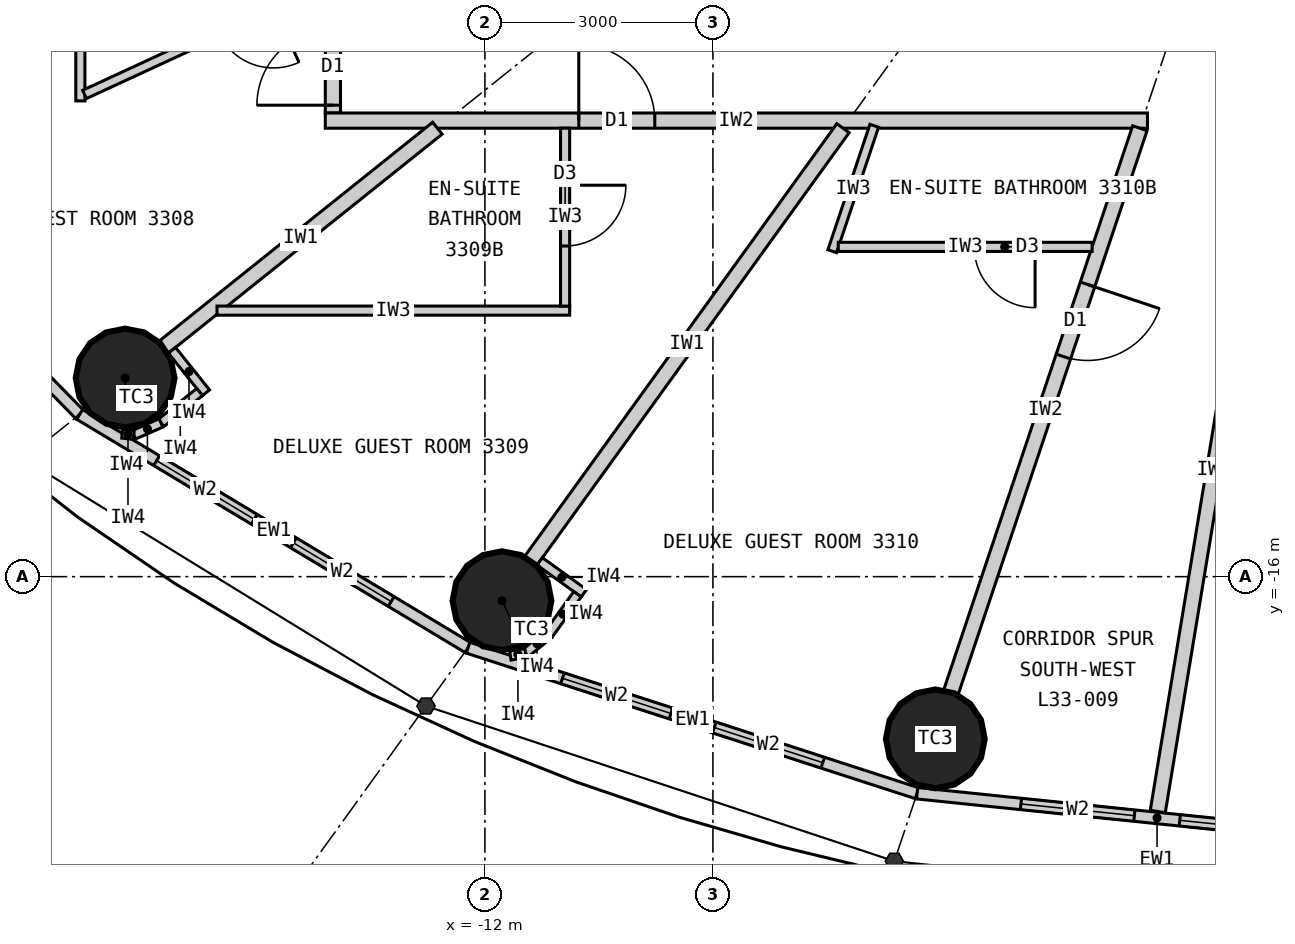
"""IFC4 building model, lengths in metres.
Left out: names, types, materials, properties, quantities, classifications, styles, units other than length and angle.
Written with IfcOpenShell. Run it as: python <this file> out.ifc"""

import sys

from ifc_helpers import new_model, si_unit, direction, frame, frame_2d, origin, origin_2d, place, context, subcontext, project, spatial, rectangle, circle, extrude, element, fill, save


model = new_model("IFC4")
c1 = context("Model", 3, precision=1e-05, world=origin(), true_north=direction((0.0, 1.0)))
c2 = subcontext(c1, "Body", "Model", "MODEL_VIEW")
j1 = project(units=[si_unit("LENGTHUNIT", "METRE"), si_unit("PLANEANGLEUNIT", "RADIAN")], contexts=[c1])
p1 = place(None, origin())
s1 = spatial("IfcSite", under=j1, at=p1, CompositionType="ELEMENT")
p2 = place(p1, origin())
s2 = spatial("IfcBuilding", under=s1, at=p2, CompositionType="ELEMENT")
p3 = place(p2, frame((0.0, 0.0, 128.7)))
s3 = spatial("IfcBuildingStorey", under=s2, at=p3, CompositionType="ELEMENT", Elevation=128.7)
for number, where, z_axis, x_axis in (
    (1, (-16.734, -13.387, 0.0), (0.0, 0.0, 1.0), (1.0, 0.0, 0.0)),
    (2, (-11.775, -16.316, 0.0), (0.0, 0.0, 1.0), (1.0, 0.0, 0.0)),
    (3, (-6.074, -18.135, 0.0), (0.0, 0.0, 1.0), (1.0, 0.0, 0.0)),
):
    element("IfcColumn", number, at=place(p3, frame(where, z_axis=z_axis, x_axis=x_axis)), inside=s3, PredefinedType="COLUMN", context=c2, shape_type="SweptSolid", body=[
        extrude(circle(Radius=0.65, at=origin_2d()), origin(), (0.0, 0.0, 1.0), 3.3),
    ])
p4 = place(p3, frame((-21.287, -9.832, 0.0), z_axis=(0.0, 0.0, 1.0), x_axis=(0.700136650834, -0.714008872605, 0.0)))
e4 = element("IfcWall", 4, at=p4, inside=s3, PredefinedType="ELEMENTEDWALL", context=c2, shape_type="SweptSolid", body=[
    extrude(rectangle(XDim=5.649, YDim=0.15, at=frame_2d((2.825, 0.0))), origin(), (0.0, 0.0, 1.0), 3.12),
])
p5 = place(p4, frame((1.025, 0.0, 0.9)))
e5 = element("IfcOpeningElement", 5, at=p5, cuts=e4, PredefinedType="OPENING", context=c2, shape_type="SweptSolid", body=[
    extrude(rectangle(XDim=1.5, YDim=1.9, at=frame_2d((0.75, 0.95))), frame((0.0, 0.085, 0.0), z_axis=(0.0, -1.0, 0.0), x_axis=(1.0, 0.0, 0.0)), (0.0, 0.0, 1.0), 0.17),
])
p6 = place(p4, frame((3.125, 0.0, 0.9)))
e6 = element("IfcOpeningElement", 6, at=p6, cuts=e4, PredefinedType="OPENING", context=c2, shape_type="SweptSolid", body=[
    extrude(rectangle(XDim=1.5, YDim=1.9, at=frame_2d((0.75, 0.95))), frame((0.0, 0.085, 0.0), z_axis=(0.0, -1.0, 0.0), x_axis=(1.0, 0.0, 0.0)), (0.0, 0.0, 1.0), 0.17),
])
p7 = place(p3, frame((-17.332, -13.866, 0.0), z_axis=(0.0, 0.0, 1.0), x_axis=(0.857308573723, -0.514802884044, 0.0)))
e7 = element("IfcWall", 7, at=p7, inside=s3, PredefinedType="ELEMENTEDWALL", context=c2, shape_type="SweptSolid", body=[
    extrude(rectangle(XDim=5.961, YDim=0.15, at=frame_2d((2.98, 0.0))), origin(), (0.0, 0.0, 1.0), 3.12),
])
p8 = place(p7, frame((1.181, 0.0, 0.9)))
e8 = element("IfcOpeningElement", 8, at=p8, cuts=e7, PredefinedType="OPENING", context=c2, shape_type="SweptSolid", body=[
    extrude(rectangle(XDim=1.5, YDim=1.9, at=frame_2d((0.75, 0.95))), frame((0.0, 0.085, 0.0), z_axis=(0.0, -1.0, 0.0), x_axis=(1.0, 0.0, 0.0)), (0.0, 0.0, 1.0), 0.17),
])
p9 = place(p7, frame((3.281, 0.0, 0.9)))
e9 = element("IfcOpeningElement", 9, at=p9, cuts=e7, PredefinedType="OPENING", context=c2, shape_type="SweptSolid", body=[
    extrude(rectangle(XDim=1.5, YDim=1.9, at=frame_2d((0.75, 0.95))), frame((0.0, 0.085, 0.0), z_axis=(0.0, -1.0, 0.0), x_axis=(1.0, 0.0, 0.0)), (0.0, 0.0, 1.0), 0.17),
])
p10 = place(p3, frame((-12.221, -16.935, 0.0), z_axis=(0.0, 0.0, 1.0), x_axis=(0.951272691506, -0.308350881944, 0.0)))
e10 = element("IfcWall", 10, at=p10, inside=s3, PredefinedType="ELEMENTEDWALL", context=c2, shape_type="SweptSolid", body=[
    extrude(rectangle(XDim=6.211, YDim=0.15, at=frame_2d((3.105, 0.0))), origin(), (0.0, 0.0, 1.0), 3.12),
])
p11 = place(p10, frame((1.305, 0.0, 0.9)))
e11 = element("IfcOpeningElement", 11, at=p11, cuts=e10, PredefinedType="OPENING", context=c2, shape_type="SweptSolid", body=[
    extrude(rectangle(XDim=1.5, YDim=1.9, at=frame_2d((0.75, 0.95))), frame((0.0, 0.085, 0.0), z_axis=(0.0, -1.0, 0.0), x_axis=(1.0, 0.0, 0.0)), (0.0, 0.0, 1.0), 0.17),
])
p12 = place(p10, frame((3.405, 0.0, 0.9)))
e12 = element("IfcOpeningElement", 12, at=p12, cuts=e10, PredefinedType="OPENING", context=c2, shape_type="SweptSolid", body=[
    extrude(rectangle(XDim=1.5, YDim=1.9, at=frame_2d((0.75, 0.95))), frame((0.0, 0.085, 0.0), z_axis=(0.0, -1.0, 0.0), x_axis=(1.0, 0.0, 0.0)), (0.0, 0.0, 1.0), 0.17),
])
p13 = place(p3, frame((-6.313, -18.85, 0.0), z_axis=(0.0, 0.0, 1.0), x_axis=(0.994735690163, -0.102473931887, 0.0)))
e13 = element("IfcWall", 13, at=p13, inside=s3, PredefinedType="ELEMENTEDWALL", context=c2, shape_type="SweptSolid", body=[
    extrude(rectangle(XDim=6.347, YDim=0.15, at=frame_2d((3.173, 0.0))), origin(), (0.0, 0.0, 1.0), 3.12),
])
p14 = place(p13, frame((1.373, 0.0, 0.9)))
e14 = element("IfcOpeningElement", 14, at=p14, cuts=e13, PredefinedType="OPENING", context=c2, shape_type="SweptSolid", body=[
    extrude(rectangle(XDim=1.5, YDim=1.9, at=frame_2d((0.75, 0.95))), frame((0.0, 0.085, 0.0), z_axis=(0.0, -1.0, 0.0), x_axis=(1.0, 0.0, 0.0)), (0.0, 0.0, 1.0), 0.17),
])
p15 = place(p13, frame((3.473, 0.0, 0.9)))
e15 = element("IfcOpeningElement", 15, at=p15, cuts=e13, PredefinedType="OPENING", context=c2, shape_type="SweptSolid", body=[
    extrude(rectangle(XDim=1.5, YDim=1.9, at=frame_2d((0.75, 0.95))), frame((0.0, 0.085, 0.0), z_axis=(0.0, -1.0, 0.0), x_axis=(1.0, 0.0, 0.0)), (0.0, 0.0, 1.0), 0.17),
])
p16 = place(p3, frame((-14.0, 9.9, 0.0), z_axis=(0.0, 0.0, 1.0), x_axis=(0.0, -1.0, 0.0)))
e16 = element("IfcWall", 16, at=p16, inside=s3, PredefinedType="PARTITIONING", context=c2, shape_type="SweptSolid", body=[
    extrude(rectangle(XDim=19.8, YDim=0.2, at=frame_2d((9.9, 0.0))), origin(), (0.0, 0.0, 1.0), 3.12),
])
p17 = place(p16, frame((2.822, 0.0, 0.0)))
e17 = element("IfcOpeningElement", 17, at=p17, cuts=e16, PredefinedType="OPENING", context=c2, shape_type="SweptSolid", body=[
    extrude(rectangle(XDim=1.0, YDim=2.2, at=frame_2d((0.5, 1.1))), frame((0.0, 0.11, 0.0), z_axis=(0.0, -1.0, 0.0), x_axis=(1.0, 0.0, 0.0)), (0.0, 0.0, 1.0), 0.22),
])
p18 = place(p16, frame((13.742, 0.0, 0.0)))
e18 = element("IfcOpeningElement", 18, at=p18, cuts=e16, PredefinedType="OPENING", context=c2, shape_type="SweptSolid", body=[
    extrude(rectangle(XDim=1.0, YDim=2.2, at=frame_2d((0.5, 1.1))), frame((0.0, 0.11, 0.0), z_axis=(0.0, -1.0, 0.0), x_axis=(1.0, 0.0, 0.0)), (0.0, 0.0, 1.0), 0.22),
])
p19 = place(p16, frame((18.698, 0.0, 0.0)))
e19 = element("IfcOpeningElement", 19, at=p19, cuts=e16, PredefinedType="OPENING", context=c2, shape_type="SweptSolid", body=[
    extrude(rectangle(XDim=1.0, YDim=2.2, at=frame_2d((0.5, 1.1))), frame((0.0, 0.11, 0.0), z_axis=(0.0, -1.0, 0.0), x_axis=(1.0, 0.0, 0.0)), (0.0, 0.0, 1.0), 0.22),
])
p20 = place(p3, frame((-3.283, -10.0, 0.0), z_axis=(0.0, 0.0, 1.0), x_axis=(-1.0, 0.0, 0.0)))
e20 = element("IfcWall", 20, at=p20, inside=s3, PredefinedType="PARTITIONING", context=c2, shape_type="SweptSolid", body=[
    extrude(rectangle(XDim=10.817, YDim=0.2, at=frame_2d((5.409, 0.0))), origin(), (0.0, 0.0, 1.0), 3.12),
])
p21 = place(p20, frame((6.482, 0.0, 0.0)))
e21 = element("IfcOpeningElement", 21, at=p21, cuts=e20, PredefinedType="OPENING", context=c2, shape_type="SweptSolid", body=[
    extrude(rectangle(XDim=1.0, YDim=2.2, at=frame_2d((0.5, 1.1))), frame((0.0, 0.11, 0.0), z_axis=(0.0, -1.0, 0.0), x_axis=(1.0, 0.0, 0.0)), (0.0, 0.0, 1.0), 0.22),
])
p22 = place(p3, frame((-14.1, -6.512, 0.0), z_axis=(0.0, 0.0, 1.0), x_axis=(-0.907833019998, -0.419331858797, 0.0)))
e22 = element("IfcWall", 22, at=p22, inside=s3, PredefinedType="PARTITIONING", context=c2, shape_type="SweptSolid", body=[
    extrude(rectangle(XDim=6.505, YDim=0.2, at=frame_2d((3.252, 0.0))), origin(), (0.0, 0.0, 1.0), 2.27),
])
p23 = place(p3, frame((-12.625, -10.1, 0.0), z_axis=(0.0, 0.0, 1.0), x_axis=(-0.780863644897, -0.624701503182, 0.0)))
e23 = element("IfcWall", 23, at=p23, inside=s3, PredefinedType="PARTITIONING", context=c2, shape_type="SweptSolid", body=[
    extrude(rectangle(XDim=4.612, YDim=0.2, at=frame_2d((2.306, 0.0))), origin(), (0.0, 0.0, 1.0), 2.37),
])
p24 = place(p3, frame((-7.289, -10.1, 0.0), z_axis=(0.0, 0.0, 1.0), x_axis=(-0.585217367024, -0.81087645997, 0.0)))
e24 = element("IfcWall", 24, at=p24, inside=s3, PredefinedType="PARTITIONING", context=c2, shape_type="SweptSolid", body=[
    extrude(rectangle(XDim=7.016, YDim=0.2, at=frame_2d((3.508, 0.0))), origin(), (0.0, 0.0, 1.0), 2.37),
])
p25 = place(p3, frame((-3.383, -10.1, 0.0), z_axis=(0.0, 0.0, 1.0), x_axis=(-0.317603705574, -0.948223542318, 0.0)))
e25 = element("IfcWall", 25, at=p25, inside=s3, PredefinedType="PARTITIONING", context=c2, shape_type="SweptSolid", body=[
    extrude(rectangle(XDim=7.823, YDim=0.2, at=frame_2d((3.912, 0.0))), origin(), (0.0, 0.0, 1.0), 2.37),
])
p26 = place(p25, frame((2.168, 0.0, 0.0)))
e26 = element("IfcOpeningElement", 26, at=p26, cuts=e25, PredefinedType="OPENING", context=c2, shape_type="SweptSolid", body=[
    extrude(rectangle(XDim=1.0, YDim=2.2, at=frame_2d((0.5, 1.1))), frame((0.0, 0.11, 0.0), z_axis=(0.0, -1.0, 0.0), x_axis=(1.0, 0.0, 0.0)), (0.0, 0.0, 1.0), 0.22),
])
p27 = place(p3, frame((-1.665, -10.1, 0.0), z_axis=(0.0, 0.0, 1.0), x_axis=(-0.162660519103, -0.986682094459, 0.0)))
e27 = element("IfcWall", 27, at=p27, inside=s3, PredefinedType="PARTITIONING", context=c2, shape_type="SweptSolid", body=[
    extrude(rectangle(XDim=9.111, YDim=0.2, at=frame_2d((4.555, 0.0))), origin(), (0.0, 0.0, 1.0), 3.12),
])
p28 = place(p27, frame((1.86, 0.0, 0.0)))
e28 = element("IfcOpeningElement", 28, at=p28, cuts=e27, PredefinedType="OPENING", context=c2, shape_type="SweptSolid", body=[
    extrude(rectangle(XDim=1.0, YDim=2.2, at=frame_2d((0.5, 1.1))), frame((0.0, 0.11, 0.0), z_axis=(0.0, -1.0, 0.0), x_axis=(1.0, 0.0, 0.0)), (0.0, 0.0, 1.0), 0.22),
])
p29 = place(p3, frame((-17.323, -8.101, 0.0), z_axis=(0.0, 0.0, 1.0), x_axis=(0.0, -1.0, 0.0)))
e29 = element("IfcWall", 29, at=p29, inside=s3, PredefinedType="PARTITIONING", context=c2, shape_type="SweptSolid", body=[
    extrude(rectangle(XDim=1.64, YDim=0.12, at=frame_2d((0.82, 0.0))), origin(), (0.0, 0.0, 1.0), 3.12),
])
p30 = place(p3, frame((-14.1, -8.193, 0.0), z_axis=(0.0, 0.0, 1.0), x_axis=(-0.907836493557, -0.419324338628, 0.0)))
e30 = element("IfcWall", 30, at=p30, inside=s3, PredefinedType="PARTITIONING", context=c2, shape_type="SweptSolid", body=[
    extrude(rectangle(XDim=3.49, YDim=0.12, at=frame_2d((1.745, 0.0))), origin(), (0.0, 0.0, 1.0), 3.12),
])
p31 = place(p30, frame((0.75, 0.0, 0.0)))
e31 = element("IfcOpeningElement", 31, at=p31, cuts=e30, PredefinedType="OPENING", context=c2, shape_type="SweptSolid", body=[
    extrude(rectangle(XDim=0.8, YDim=2.1, at=frame_2d((0.4, 1.05))), frame((0.0, 0.07, 0.0), z_axis=(0.0, -1.0, 0.0), x_axis=(1.0, 0.0, 0.0)), (0.0, 0.0, 1.0), 0.14),
])
p32 = place(p3, frame((-15.525, -12.5, 0.0), z_axis=(0.0, 0.0, 1.0), x_axis=(1.0, 0.0, 0.0)))
e32 = element("IfcWall", 32, at=p32, inside=s3, PredefinedType="PARTITIONING", context=c2, shape_type="SweptSolid", body=[
    extrude(rectangle(XDim=4.64, YDim=0.12, at=frame_2d((2.32, 0.0))), origin(), (0.0, 0.0, 1.0), 3.12),
])
p33 = place(p3, frame((-10.945, -10.1, 0.0), z_axis=(0.0, 0.0, 1.0), x_axis=(0.0, -1.0, 0.0)))
e33 = element("IfcWall", 33, at=p33, inside=s3, PredefinedType="PARTITIONING", context=c2, shape_type="SweptSolid", body=[
    extrude(rectangle(XDim=2.34, YDim=0.12, at=frame_2d((1.17, 0.0))), origin(), (0.0, 0.0, 1.0), 3.12),
])
p34 = place(p33, frame((0.75, 0.0, 0.0)))
e34 = element("IfcOpeningElement", 34, at=p34, cuts=e33, PredefinedType="OPENING", context=c2, shape_type="SweptSolid", body=[
    extrude(rectangle(XDim=0.8, YDim=2.1, at=frame_2d((0.4, 1.05))), frame((0.0, 0.07, 0.0), z_axis=(0.0, -1.0, 0.0), x_axis=(1.0, 0.0, 0.0)), (0.0, 0.0, 1.0), 0.14),
])
p35 = place(p3, frame((-6.878, -10.068, 0.0), z_axis=(0.0, 0.0, 1.0), x_axis=(-0.317532394508, -0.948247424694, 0.0)))
e35 = element("IfcWall", 35, at=p35, inside=s3, PredefinedType="PARTITIONING", context=c2, shape_type="SweptSolid", body=[
    extrude(rectangle(XDim=1.74, YDim=0.12, at=frame_2d((0.87, 0.0))), origin(), (0.0, 0.0, 1.0), 3.12),
])
p36 = place(p3, frame((-4.011, -11.661, 0.0), z_axis=(0.0, 0.0, 1.0), x_axis=(-1.0, 0.0, 0.0)))
e36 = element("IfcWall", 36, at=p36, inside=s3, PredefinedType="PARTITIONING", context=c2, shape_type="SweptSolid", body=[
    extrude(rectangle(XDim=3.34, YDim=0.12, at=frame_2d((1.67, 0.0))), origin(), (0.0, 0.0, 1.0), 3.12),
])
p37 = place(p36, frame((0.75, 0.0, 0.0)))
e37 = element("IfcOpeningElement", 37, at=p37, cuts=e36, PredefinedType="OPENING", context=c2, shape_type="SweptSolid", body=[
    extrude(rectangle(XDim=0.8, YDim=2.1, at=frame_2d((0.4, 1.05))), frame((0.0, 0.07, 0.0), z_axis=(0.0, -1.0, 0.0), x_axis=(1.0, 0.0, 0.0)), (0.0, 0.0, 1.0), 0.14),
])
p38 = place(p3, frame((-16.117, -13.022, 0.0), z_axis=(0.0, 0.0, 1.0), x_axis=(0.62465344249, -0.780902091677, 0.0)))
e38 = element("IfcWall", 38, at=p38, inside=s3, PredefinedType="PARTITIONING", context=c2, shape_type="SweptSolid", body=[
    extrude(rectangle(XDim=0.716, YDim=0.12, at=frame_2d((0.358, 0.0))), origin(), (0.0, 0.0, 1.0), 3.12),
])
p39 = place(p3, frame((-15.754, -13.571, 0.0), z_axis=(0.0, 0.0, 1.0), x_axis=(-0.780905453553, -0.624649239663, 0.0)))
e39 = element("IfcWall", 39, at=p39, inside=s3, PredefinedType="PARTITIONING", context=c2, shape_type="SweptSolid", body=[
    extrude(rectangle(XDim=0.65, YDim=0.12, at=frame_2d((0.325, 0.0))), origin(), (0.0, 0.0, 1.0), 3.12),
])
p40 = place(p3, frame((-16.262, -13.977, 0.0), z_axis=(0.0, 0.0, 1.0), x_axis=(-0.915985403703, -0.401211590314, 0.0)))
e40 = element("IfcWall", 40, at=p40, inside=s3, PredefinedType="PARTITIONING", context=c2, shape_type="SweptSolid", body=[
    extrude(rectangle(XDim=0.391, YDim=0.12, at=frame_2d((0.196, 0.0))), origin(), (0.0, 0.0, 1.0), 3.12),
])
p41 = place(p3, frame((-16.62, -14.134, 0.0), z_axis=(0.0, 0.0, 1.0), x_axis=(-0.993941871493, 0.109907033867, 0.0)))
e41 = element("IfcWall", 41, at=p41, inside=s3, PredefinedType="PARTITIONING", context=c2, shape_type="SweptSolid", body=[
    extrude(rectangle(XDim=0.153, YDim=0.12, at=frame_2d((0.077, 0.0))), origin(), (0.0, 0.0, 1.0), 3.12),
])
p42 = place(p3, frame((-11.279, -15.799, 0.0), z_axis=(0.0, 0.0, 1.0), x_axis=(0.810912957127, -0.585166793285, 0.0)))
e42 = element("IfcWall", 42, at=p42, inside=s3, PredefinedType="PARTITIONING", context=c2, shape_type="SweptSolid", body=[
    extrude(rectangle(XDim=0.716, YDim=0.12, at=frame_2d((0.358, 0.0))), origin(), (0.0, 0.0, 1.0), 3.12),
])
p43 = place(p3, frame((-10.782, -16.231, 0.0), z_axis=(0.0, 0.0, 1.0), x_axis=(-0.585175102182, -0.810906961239, 0.0)))
e43 = element("IfcWall", 43, at=p43, inside=s3, PredefinedType="PARTITIONING", context=c2, shape_type="SweptSolid", body=[
    extrude(rectangle(XDim=0.65, YDim=0.12, at=frame_2d((0.325, 0.0))), origin(), (0.0, 0.0, 1.0), 3.12),
])
p44 = place(p3, frame((-11.162, -16.759, 0.0), z_axis=(0.0, 0.0, 1.0), x_axis=(-0.775178428527, -0.63174235567, 0.0)))
e44 = element("IfcWall", 44, at=p44, inside=s3, PredefinedType="PARTITIONING", context=c2, shape_type="SweptSolid", body=[
    extrude(rectangle(XDim=0.392, YDim=0.12, at=frame_2d((0.196, 0.0))), origin(), (0.0, 0.0, 1.0), 3.12),
])
p45 = place(p3, frame((-11.466, -17.006, 0.0), z_axis=(0.0, 0.0, 1.0), x_axis=(-0.987228877621, -0.15930832744, 0.0)))
e45 = element("IfcWall", 45, at=p45, inside=s3, PredefinedType="PARTITIONING", context=c2, shape_type="SweptSolid", body=[
    extrude(rectangle(XDim=0.202, YDim=0.12, at=frame_2d((0.101, 0.0))), origin(), (0.0, 0.0, 1.0), 3.12),
])
p46 = place(p8, origin())
e46 = element("IfcWindow", 46, at=p46, inside=s3, PartitioningType="SINGLE_PANEL", PredefinedType="WINDOW", context=c2, shape_type="SweptSolid", body=[
    extrude(rectangle(XDim=1.5, YDim=1.9, at=frame_2d((0.75, 0.95))), frame((0.0, 0.03, 0.0), z_axis=(0.0, -1.0, 0.0), x_axis=(1.0, 0.0, 0.0)), (0.0, 0.0, 1.0), 0.06),
])
fill(e8, e46)
p47 = place(p9, origin())
e47 = element("IfcWindow", 47, at=p47, inside=s3, PartitioningType="SINGLE_PANEL", PredefinedType="WINDOW", context=c2, shape_type="SweptSolid", body=[
    extrude(rectangle(XDim=1.5, YDim=1.9, at=frame_2d((0.75, 0.95))), frame((0.0, 0.03, 0.0), z_axis=(0.0, -1.0, 0.0), x_axis=(1.0, 0.0, 0.0)), (0.0, 0.0, 1.0), 0.06),
])
fill(e9, e47)
p48 = place(p11, origin())
e48 = element("IfcWindow", 48, at=p48, inside=s3, PartitioningType="SINGLE_PANEL", PredefinedType="WINDOW", context=c2, shape_type="SweptSolid", body=[
    extrude(rectangle(XDim=1.5, YDim=1.9, at=frame_2d((0.75, 0.95))), frame((0.0, 0.03, 0.0), z_axis=(0.0, -1.0, 0.0), x_axis=(1.0, 0.0, 0.0)), (0.0, 0.0, 1.0), 0.06),
])
fill(e11, e48)
p49 = place(p12, origin())
e49 = element("IfcWindow", 49, at=p49, inside=s3, PartitioningType="SINGLE_PANEL", PredefinedType="WINDOW", context=c2, shape_type="SweptSolid", body=[
    extrude(rectangle(XDim=1.5, YDim=1.9, at=frame_2d((0.75, 0.95))), frame((0.0, 0.03, 0.0), z_axis=(0.0, -1.0, 0.0), x_axis=(1.0, 0.0, 0.0)), (0.0, 0.0, 1.0), 0.06),
])
fill(e12, e49)
p50 = place(p14, origin())
e50 = element("IfcWindow", 50, at=p50, inside=s3, PartitioningType="SINGLE_PANEL", PredefinedType="WINDOW", context=c2, shape_type="SweptSolid", body=[
    extrude(rectangle(XDim=1.5, YDim=1.9, at=frame_2d((0.75, 0.95))), frame((0.0, 0.03, 0.0), z_axis=(0.0, -1.0, 0.0), x_axis=(1.0, 0.0, 0.0)), (0.0, 0.0, 1.0), 0.06),
])
fill(e14, e50)
p51 = place(p15, origin())
e51 = element("IfcWindow", 51, at=p51, inside=s3, PartitioningType="SINGLE_PANEL", PredefinedType="WINDOW", context=c2, shape_type="SweptSolid", body=[
    extrude(rectangle(XDim=1.5, YDim=1.9, at=frame_2d((0.75, 0.95))), frame((0.0, 0.03, 0.0), z_axis=(0.0, -1.0, 0.0), x_axis=(1.0, 0.0, 0.0)), (0.0, 0.0, 1.0), 0.06),
])
fill(e15, e51)
p52 = place(p19, origin())
e52 = element("IfcDoor", 52, at=p52, inside=s3, OperationType="SINGLE_SWING_RIGHT", PredefinedType="DOOR", context=c2, shape_type="SweptSolid", body=[
    extrude(rectangle(XDim=1.0, YDim=2.2, at=frame_2d((0.5, 1.1))), frame((0.0, 0.025, 0.0), z_axis=(0.0, -1.0, 0.0), x_axis=(1.0, 0.0, 0.0)), (0.0, 0.0, 1.0), 0.05),
])
fill(e19, e52)
p53 = place(p34, origin())
e53 = element("IfcDoor", 53, at=p53, inside=s3, OperationType="SINGLE_SWING_LEFT", PredefinedType="DOOR", context=c2, shape_type="SweptSolid", body=[
    extrude(rectangle(XDim=0.8, YDim=2.1, at=frame_2d((0.4, 1.05))), frame((0.0, 0.025, 0.0), z_axis=(0.0, -1.0, 0.0), x_axis=(1.0, 0.0, 0.0)), (0.0, 0.0, 1.0), 0.05),
])
fill(e34, e53)
p54 = place(p21, origin())
e54 = element("IfcDoor", 54, at=p54, inside=s3, OperationType="SINGLE_SWING_RIGHT", PredefinedType="DOOR", context=c2, shape_type="SweptSolid", body=[
    extrude(rectangle(XDim=1.0, YDim=2.2, at=frame_2d((0.5, 1.1))), frame((0.0, 0.025, 0.0), z_axis=(0.0, -1.0, 0.0), x_axis=(1.0, 0.0, 0.0)), (0.0, 0.0, 1.0), 0.05),
])
fill(e21, e54)
p55 = place(p37, origin())
e55 = element("IfcDoor", 55, at=p55, inside=s3, OperationType="SINGLE_SWING_LEFT", PredefinedType="DOOR", context=c2, shape_type="SweptSolid", body=[
    extrude(rectangle(XDim=0.8, YDim=2.1, at=frame_2d((0.4, 1.05))), frame((0.0, 0.025, 0.0), z_axis=(0.0, -1.0, 0.0), x_axis=(1.0, 0.0, 0.0)), (0.0, 0.0, 1.0), 0.05),
])
fill(e37, e55)
p56 = place(p26, origin())
e56 = element("IfcDoor", 56, at=p56, inside=s3, OperationType="SINGLE_SWING_LEFT", PredefinedType="DOOR", context=c2, shape_type="SweptSolid", body=[
    extrude(rectangle(XDim=1.0, YDim=2.2, at=frame_2d((0.5, 1.1))), frame((0.0, 0.025, 0.0), z_axis=(0.0, -1.0, 0.0), x_axis=(1.0, 0.0, 0.0)), (0.0, 0.0, 1.0), 0.05),
])
fill(e26, e56)
save(model, sys.argv[1])
